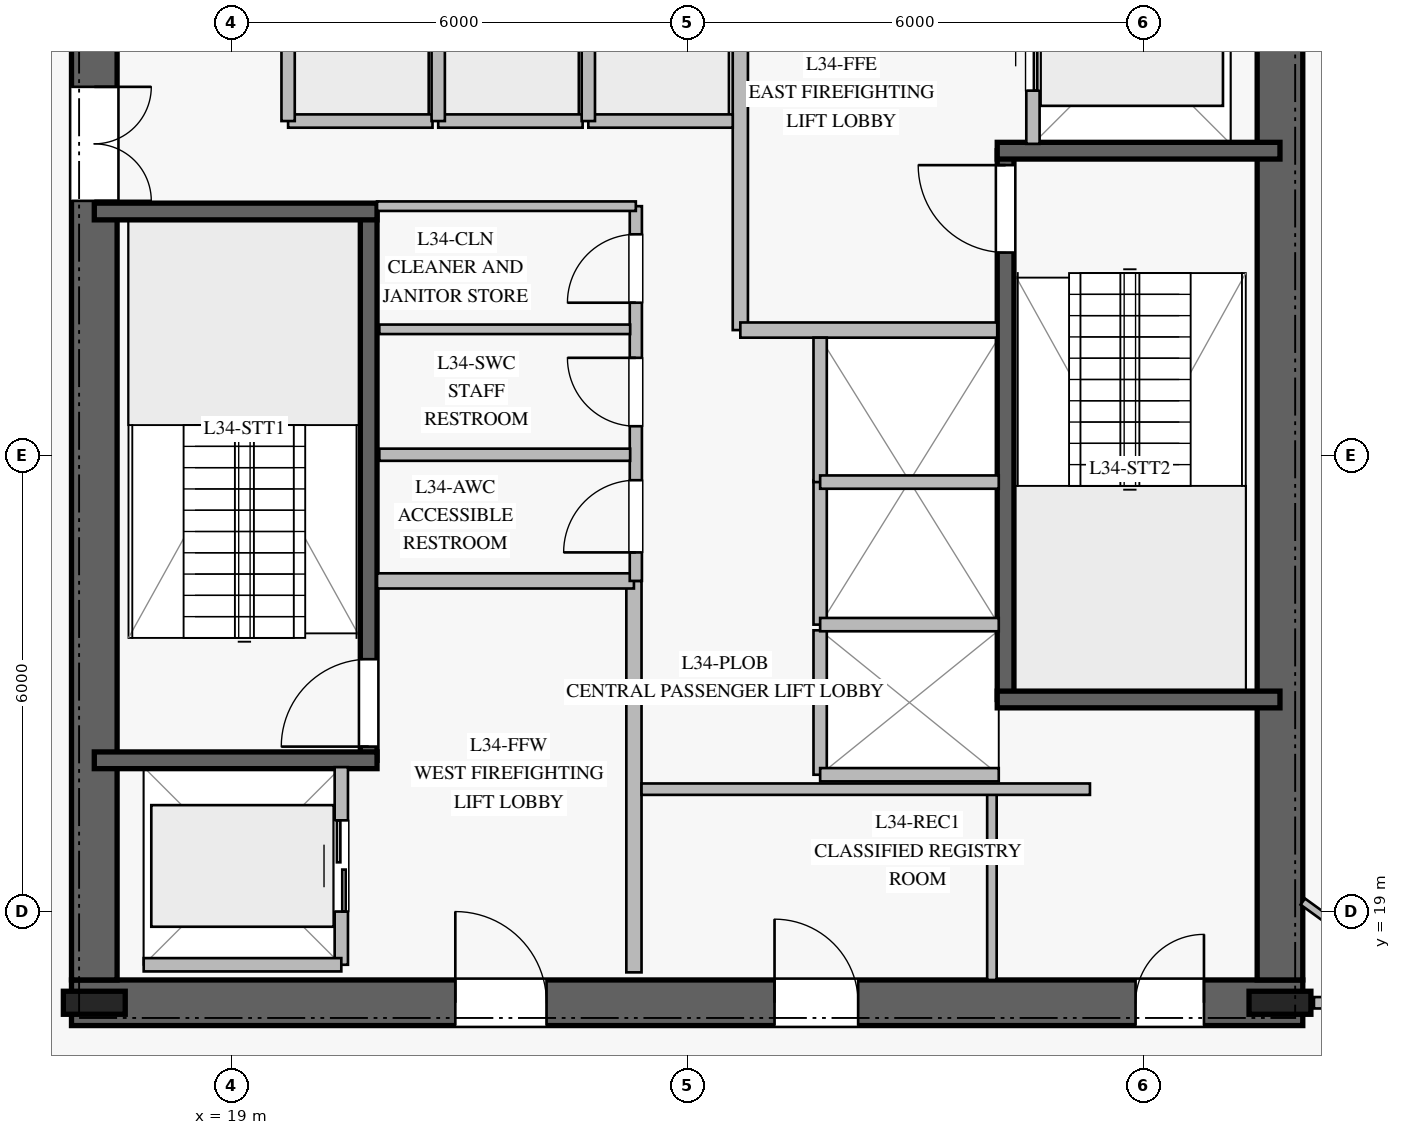
"""IFC4 building model, lengths in metres.
Left out: names, types, materials, properties, quantities, classifications, styles, units other than length and angle.
Written with IfcOpenShell. Run it as: python <this file> out.ifc"""

import sys

from ifc_helpers import new_model, si_unit, direction, frame, frame_2d, origin, origin_2d, place, context, subcontext, project, spatial, rectangle, i_section, extrude, element, fill, save


model = new_model("IFC4")
c1 = context("Model", 3, precision=1e-05, world=origin(), true_north=direction((0.0, 1.0)))
c2 = subcontext(c1, "Body", "Model", "MODEL_VIEW")
j1 = project(units=[si_unit("LENGTHUNIT", "METRE"), si_unit("PLANEANGLEUNIT", "RADIAN")], contexts=[c1])
p1 = place(None, origin())
s1 = spatial("IfcSite", under=j1, at=p1, CompositionType="ELEMENT")
p2 = place(p1, origin())
s2 = spatial("IfcBuilding", under=s1, at=p2, CompositionType="ELEMENT")
p3 = place(p2, frame((0.0, 0.0, 142.4)))
s3 = spatial("IfcBuildingStorey", under=s2, at=p3, CompositionType="ELEMENT", Elevation=142.4)
p4 = place(p3, frame((16.9, 17.8, 0.0), z_axis=(0.0, 0.0, 1.0), x_axis=(1.0, 0.0, 0.0)))
e1 = element("IfcWall", 1, at=p4, inside=s3, PredefinedType="SHEAR", context=c2, shape_type="SweptSolid", body=[
    extrude(rectangle(XDim=16.2, YDim=0.6, at=frame_2d((8.1, 0.0))), origin(), (0.0, 0.0, 1.0), 3.76),
])
p5 = place(p4, frame((5.05, 0.0, 0.0)))
e2 = element("IfcOpeningElement", 2, at=p5, cuts=e1, PredefinedType="OPENING", context=c2, shape_type="SweptSolid", body=[
    extrude(rectangle(XDim=1.2, YDim=2.25, at=frame_2d((0.6, 1.125))), frame((0.0, 0.31, 0.0), z_axis=(0.0, -1.0, 0.0), x_axis=(1.0, 0.0, 0.0)), (0.0, 0.0, 1.0), 0.62),
])
p6 = place(p4, frame((14.0, 0.0, 0.0)))
e3 = element("IfcOpeningElement", 3, at=p6, cuts=e1, PredefinedType="OPENING", context=c2, shape_type="SweptSolid", body=[
    extrude(rectangle(XDim=0.9, YDim=2.1, at=frame_2d((0.45, 1.05))), frame((0.0, 0.31, 0.0), z_axis=(0.0, -1.0, 0.0), x_axis=(1.0, 0.0, 0.0)), (0.0, 0.0, 1.0), 0.62),
])
p7 = place(p4, frame((9.25, 0.0, 0.0)))
e4 = element("IfcOpeningElement", 4, at=p7, cuts=e1, PredefinedType="OPENING", context=c2, shape_type="SweptSolid", body=[
    extrude(rectangle(XDim=1.1, YDim=2.2, at=frame_2d((0.55, 1.1))), frame((0.0, 0.31, 0.0), z_axis=(0.0, -1.0, 0.0), x_axis=(1.0, 0.0, 0.0)), (0.0, 0.0, 1.0), 0.62),
])
p8 = place(p3, frame((17.2, 31.9, 0.0), z_axis=(0.0, 0.0, 1.0), x_axis=(0.0, -1.0, 0.0)))
e5 = element("IfcWall", 5, at=p8, inside=s3, PredefinedType="SHEAR", context=c2, shape_type="SweptSolid", body=[
    extrude(rectangle(XDim=13.8, YDim=0.6, at=frame_2d((6.9, 0.0))), origin(), (0.0, 0.0, 1.0), 3.76),
])
p9 = place(p8, frame((2.05, 0.0, 0.0)))
e6 = element("IfcOpeningElement", 6, at=p9, cuts=e5, PredefinedType="OPENING", context=c2, shape_type="SweptSolid", body=[
    extrude(rectangle(XDim=1.5, YDim=2.2, at=frame_2d((0.75, 1.1))), frame((0.0, 0.31, 0.0), z_axis=(0.0, -1.0, 0.0), x_axis=(1.0, 0.0, 0.0)), (0.0, 0.0, 1.0), 0.62),
])
p10 = place(p3, frame((32.8, 18.1, 0.0), z_axis=(0.0, 0.0, 1.0), x_axis=(0.0, 1.0, 0.0)))
e7 = element("IfcWall", 7, at=p10, inside=s3, PredefinedType="SHEAR", context=c2, shape_type="SweptSolid", body=[
    extrude(rectangle(XDim=13.8, YDim=0.6, at=frame_2d((6.9, 0.0))), origin(), (0.0, 0.0, 1.0), 3.76),
])
for number, where, z_axis, x_axis in (
    (8, (17.2, 17.8, 0.0), (0.0, 0.0, 1.0), (1.0, 0.0, 0.0)),
    (9, (32.8, 17.8, 0.0), (0.0, 0.0, 1.0), (1.0, 0.0, 0.0)),
):
    element("IfcColumn", number, at=place(p3, frame(where, z_axis=z_axis, x_axis=x_axis)), inside=s3, PredefinedType="COLUMN", context=c2, shape_type="SweptSolid", body=[
        extrude(i_section(OverallWidth=0.303, OverallDepth=0.814, WebThickness=0.021, FlangeThickness=0.04, at=origin_2d()), origin(), (0.0, 0.0, 1.0), 4.0),
    ])
p11 = place(p3, frame((20.81, 20.99, 0.0), z_axis=(0.0, 0.0, 1.0), x_axis=(0.0, 1.0, 0.0)))
e10 = element("IfcWall", 10, at=p11, inside=s3, PredefinedType="SOLIDWALL", context=c2, shape_type="SweptSolid", body=[
    extrude(rectangle(XDim=7.22, YDim=0.22, at=frame_2d((3.61, 0.0))), origin(), (0.0, 0.0, 1.0), 3.76),
])
p12 = place(p11, frame((0.18, 0.0, 0.0)))
e11 = element("IfcOpeningElement", 11, at=p12, cuts=e10, PredefinedType="OPENING", context=c2, shape_type="SweptSolid", body=[
    extrude(rectangle(XDim=1.15, YDim=2.2, at=frame_2d((0.575, 1.1))), frame((0.0, 0.12, 0.0), z_axis=(0.0, -1.0, 0.0), x_axis=(1.0, 0.0, 0.0)), (0.0, 0.0, 1.0), 0.24),
])
for number, where, z_axis, x_axis in (
    (12, (17.2, 20.99, 0.0), (0.0, 0.0, 1.0), (1.0, 0.0, 0.0)),
    (13, (17.2, 28.21, 0.0), (0.0, 0.0, 1.0), (1.0, 0.0, 0.0)),
):
    element("IfcWall", number, at=place(p3, frame(where, z_axis=z_axis, x_axis=x_axis)), inside=s3, PredefinedType="SOLIDWALL", context=c2, shape_type="SweptSolid", body=[
        extrude(rectangle(XDim=3.72, YDim=0.22, at=frame_2d((1.86, 0.0))), origin(), (0.0, 0.0, 1.0), 3.76),
    ])
p13 = place(p3, frame((29.19, 21.79, 0.0), z_axis=(0.0, 0.0, 1.0), x_axis=(0.0, 1.0, 0.0)))
e14 = element("IfcWall", 14, at=p13, inside=s3, PredefinedType="SOLIDWALL", context=c2, shape_type="SweptSolid", body=[
    extrude(rectangle(XDim=7.22, YDim=0.22, at=frame_2d((3.61, 0.0))), origin(), (0.0, 0.0, 1.0), 3.76),
])
p14 = place(p13, frame((5.88, 0.0, 0.0)))
e15 = element("IfcOpeningElement", 15, at=p14, cuts=e14, PredefinedType="OPENING", context=c2, shape_type="SweptSolid", body=[
    extrude(rectangle(XDim=1.15, YDim=2.2, at=frame_2d((0.575, 1.1))), frame((0.0, 0.12, 0.0), z_axis=(0.0, -1.0, 0.0), x_axis=(1.0, 0.0, 0.0)), (0.0, 0.0, 1.0), 0.24),
])
for number, where, z_axis, x_axis in (
    (16, (29.08, 21.79, 0.0), (0.0, 0.0, 1.0), (1.0, 0.0, 0.0)),
    (17, (29.08, 29.01, 0.0), (0.0, 0.0, 1.0), (1.0, 0.0, 0.0)),
):
    element("IfcWall", number, at=place(p3, frame(where, z_axis=z_axis, x_axis=x_axis)), inside=s3, PredefinedType="SOLIDWALL", context=c2, shape_type="SweptSolid", body=[
        extrude(rectangle(XDim=3.72, YDim=0.22, at=frame_2d((1.86, 0.0))), origin(), (0.0, 0.0, 1.0), 3.76),
    ])
p15 = place(p3, frame((24.3, 18.2, 0.0), z_axis=(0.0, 0.0, 1.0), x_axis=(0.0, 1.0, 0.0)))
e18 = element("IfcWall", 18, at=p15, inside=s3, PredefinedType="PARTITIONING", context=c2, shape_type="SweptSolid", body=[
    extrude(rectangle(XDim=5.15, YDim=0.2, at=frame_2d((2.575, 0.0))), origin(), (0.0, 0.0, 1.0), 3.76),
])
p16 = place(p3, frame((20.92, 23.35, 0.0), z_axis=(0.0, 0.0, 1.0), x_axis=(1.0, 0.0, 0.0)))
e19 = element("IfcWall", 19, at=p16, inside=s3, PredefinedType="PARTITIONING", context=c2, shape_type="SweptSolid", body=[
    extrude(rectangle(XDim=3.38, YDim=0.2, at=frame_2d((1.69, 0.0))), origin(), (0.0, 0.0, 1.0), 3.76),
])
p17 = place(p3, frame((25.7, 26.65, 0.0), z_axis=(0.0, 0.0, 1.0), x_axis=(0.0, 1.0, 0.0)))
e20 = element("IfcWall", 20, at=p17, inside=s3, PredefinedType="PARTITIONING", context=c2, shape_type="SweptSolid", body=[
    extrude(rectangle(XDim=5.15, YDim=0.2, at=frame_2d((2.575, 0.0))), origin(), (0.0, 0.0, 1.0), 3.76),
])
p18 = place(p3, frame((25.7, 26.65, 0.0), z_axis=(0.0, 0.0, 1.0), x_axis=(1.0, 0.0, 0.0)))
e21 = element("IfcWall", 21, at=p18, inside=s3, PredefinedType="PARTITIONING", context=c2, shape_type="SweptSolid", body=[
    extrude(rectangle(XDim=3.38, YDim=0.2, at=frame_2d((1.69, 0.0))), origin(), (0.0, 0.0, 1.0), 3.76),
])
p19 = place(p3, frame((24.325, 23.35, 0.0), z_axis=(0.0, 0.0, 1.0), x_axis=(0.0, 1.0, 0.0)))
e22 = element("IfcWall", 22, at=p19, inside=s3, PredefinedType="PLUMBINGWALL", context=c2, shape_type="SweptSolid", body=[
    extrude(rectangle(XDim=4.93, YDim=0.16, at=frame_2d((2.465, 0.0))), origin(), (0.0, 0.0, 1.0), 3.76),
])
p20 = place(p19, frame((0.375, 0.0, 0.0)))
e23 = element("IfcOpeningElement", 23, at=p20, cuts=e22, PredefinedType="OPENING", context=c2, shape_type="SweptSolid", body=[
    extrude(rectangle(XDim=0.95, YDim=2.1, at=frame_2d((0.475, 1.05))), frame((0.0, 0.09, 0.0), z_axis=(0.0, -1.0, 0.0), x_axis=(1.0, 0.0, 0.0)), (0.0, 0.0, 1.0), 0.18),
])
p21 = place(p19, frame((2.035, 0.0, 0.0)))
e24 = element("IfcOpeningElement", 24, at=p21, cuts=e22, PredefinedType="OPENING", context=c2, shape_type="SweptSolid", body=[
    extrude(rectangle(XDim=0.9, YDim=2.1, at=frame_2d((0.45, 1.05))), frame((0.0, 0.09, 0.0), z_axis=(0.0, -1.0, 0.0), x_axis=(1.0, 0.0, 0.0)), (0.0, 0.0, 1.0), 0.18),
])
p22 = place(p19, frame((3.66, 0.0, 0.0)))
e25 = element("IfcOpeningElement", 25, at=p22, cuts=e22, PredefinedType="OPENING", context=c2, shape_type="SweptSolid", body=[
    extrude(rectangle(XDim=0.9, YDim=2.1, at=frame_2d((0.45, 1.05))), frame((0.0, 0.09, 0.0), z_axis=(0.0, -1.0, 0.0), x_axis=(1.0, 0.0, 0.0)), (0.0, 0.0, 1.0), 0.18),
])
p23 = place(p3, frame((20.92, 28.28, 0.0), z_axis=(0.0, 0.0, 1.0), x_axis=(1.0, 0.0, 0.0)))
e26 = element("IfcWall", 26, at=p23, inside=s3, PredefinedType="PARTITIONING", context=c2, shape_type="SweptSolid", body=[
    extrude(rectangle(XDim=3.405, YDim=0.125, at=frame_2d((1.703, 0.0))), origin(), (0.0, 0.0, 1.0), 3.76),
])
p24 = place(p3, frame((29.01, 18.1, 0.0), z_axis=(0.0, 0.0, 1.0), x_axis=(0.0, 1.0, 0.0)))
e27 = element("IfcWall", 27, at=p24, inside=s3, PredefinedType="PARTITIONING", context=c2, shape_type="SweptSolid", body=[
    extrude(rectangle(XDim=2.45, YDim=0.125, at=frame_2d((1.225, 0.0))), origin(), (0.0, 0.0, 1.0), 3.76),
])
p25 = place(p3, frame((20.95, 25.01, 0.0), z_axis=(0.0, 0.0, 1.0), x_axis=(1.0, 0.0, 0.0)))
e28 = element("IfcWall", 28, at=p25, inside=s3, PredefinedType="PLUMBINGWALL", context=c2, shape_type="SweptSolid", body=[
    extrude(rectangle(XDim=3.3, YDim=0.16, at=frame_2d((1.65, 0.0))), origin(), (0.0, 0.0, 1.0), 3.76),
])
p26 = place(p3, frame((20.95, 26.66, 0.0), z_axis=(0.0, 0.0, 1.0), x_axis=(1.0, 0.0, 0.0)))
e29 = element("IfcWall", 29, at=p26, inside=s3, PredefinedType="PARTITIONING", context=c2, shape_type="SweptSolid", body=[
    extrude(rectangle(XDim=3.3, YDim=0.125, at=frame_2d((1.65, 0.0))), origin(), (0.0, 0.0, 1.0), 3.76),
])
p27 = place(p3, frame((24.4, 20.61, 0.0), z_axis=(0.0, 0.0, 1.0), x_axis=(1.0, 0.0, 0.0)))
e30 = element("IfcWall", 30, at=p27, inside=s3, PredefinedType="PARTITIONING", context=c2, shape_type="SweptSolid", body=[
    extrude(rectangle(XDim=5.9, YDim=0.15, at=frame_2d((2.95, 0.0))), origin(), (0.0, 0.0, 1.0), 3.76),
])
p28 = place(p3, frame((19.75, 29.4, 0.0), z_axis=(0.0, 0.0, 1.0), x_axis=(1.0, 0.0, 0.0)))
e31 = element("IfcWall", 31, at=p28, inside=s3, PredefinedType="PARTITIONING", context=c2, shape_type="SweptSolid", body=[
    extrude(rectangle(XDim=1.9, YDim=0.175, at=frame_2d((0.95, 0.0))), origin(), (0.0, 0.0, 1.0), 3.76),
])
p29 = place(p3, frame((19.75, 29.4, 0.0), z_axis=(0.0, 0.0, 1.0), x_axis=(0.0, 1.0, 0.0)))
e32 = element("IfcWall", 32, at=p29, inside=s3, PredefinedType="PARTITIONING", context=c2, shape_type="SweptSolid", body=[
    extrude(rectangle(XDim=2.35, YDim=0.175, at=frame_2d((1.175, 0.0))), origin(), (0.0, 0.0, 1.0), 3.76),
])
p30 = place(p3, frame((21.725, 29.4, 0.0), z_axis=(0.0, 0.0, 1.0), x_axis=(1.0, 0.0, 0.0)))
e33 = element("IfcWall", 33, at=p30, inside=s3, PredefinedType="PARTITIONING", context=c2, shape_type="SweptSolid", body=[
    extrude(rectangle(XDim=1.9, YDim=0.175, at=frame_2d((0.95, 0.0))), origin(), (0.0, 0.0, 1.0), 3.76),
])
p31 = place(p3, frame((21.725, 29.4, 0.0), z_axis=(0.0, 0.0, 1.0), x_axis=(0.0, 1.0, 0.0)))
e34 = element("IfcWall", 34, at=p31, inside=s3, PredefinedType="PARTITIONING", context=c2, shape_type="SweptSolid", body=[
    extrude(rectangle(XDim=2.35, YDim=0.175, at=frame_2d((1.175, 0.0))), origin(), (0.0, 0.0, 1.0), 3.76),
])
p32 = place(p3, frame((23.7, 29.4, 0.0), z_axis=(0.0, 0.0, 1.0), x_axis=(1.0, 0.0, 0.0)))
e35 = element("IfcWall", 35, at=p32, inside=s3, PredefinedType="PARTITIONING", context=c2, shape_type="SweptSolid", body=[
    extrude(rectangle(XDim=1.9, YDim=0.175, at=frame_2d((0.95, 0.0))), origin(), (0.0, 0.0, 1.0), 3.76),
])
p33 = place(p3, frame((23.7, 29.4, 0.0), z_axis=(0.0, 0.0, 1.0), x_axis=(0.0, 1.0, 0.0)))
e36 = element("IfcWall", 36, at=p33, inside=s3, PredefinedType="PARTITIONING", context=c2, shape_type="SweptSolid", body=[
    extrude(rectangle(XDim=2.35, YDim=0.175, at=frame_2d((1.175, 0.0))), origin(), (0.0, 0.0, 1.0), 3.76),
])
p34 = place(p3, frame((26.75, 20.8, 0.0), z_axis=(0.0, 0.0, 1.0), x_axis=(0.0, 1.0, 0.0)))
e37 = element("IfcWall", 37, at=p34, inside=s3, PredefinedType="PARTITIONING", context=c2, shape_type="SweptSolid", body=[
    extrude(rectangle(XDim=1.9, YDim=0.175, at=frame_2d((0.95, 0.0))), origin(), (0.0, 0.0, 1.0), 3.76),
])
p35 = place(p3, frame((26.75, 20.8, 0.0), z_axis=(0.0, 0.0, 1.0), x_axis=(1.0, 0.0, 0.0)))
e38 = element("IfcWall", 38, at=p35, inside=s3, PredefinedType="PARTITIONING", context=c2, shape_type="SweptSolid", body=[
    extrude(rectangle(XDim=2.35, YDim=0.175, at=frame_2d((1.175, 0.0))), origin(), (0.0, 0.0, 1.0), 3.76),
])
p36 = place(p3, frame((26.75, 22.775, 0.0), z_axis=(0.0, 0.0, 1.0), x_axis=(0.0, 1.0, 0.0)))
e39 = element("IfcWall", 39, at=p36, inside=s3, PredefinedType="PARTITIONING", context=c2, shape_type="SweptSolid", body=[
    extrude(rectangle(XDim=1.9, YDim=0.175, at=frame_2d((0.95, 0.0))), origin(), (0.0, 0.0, 1.0), 3.76),
])
p37 = place(p3, frame((26.75, 22.775, 0.0), z_axis=(0.0, 0.0, 1.0), x_axis=(1.0, 0.0, 0.0)))
e40 = element("IfcWall", 40, at=p37, inside=s3, PredefinedType="PARTITIONING", context=c2, shape_type="SweptSolid", body=[
    extrude(rectangle(XDim=2.35, YDim=0.175, at=frame_2d((1.175, 0.0))), origin(), (0.0, 0.0, 1.0), 3.76),
])
p38 = place(p3, frame((26.75, 24.65, 0.0), z_axis=(0.0, 0.0, 1.0), x_axis=(0.0, 1.0, 0.0)))
e41 = element("IfcWall", 41, at=p38, inside=s3, PredefinedType="PARTITIONING", context=c2, shape_type="SweptSolid", body=[
    extrude(rectangle(XDim=1.9, YDim=0.175, at=frame_2d((0.95, 0.0))), origin(), (0.0, 0.0, 1.0), 3.76),
])
p39 = place(p3, frame((26.75, 24.65, 0.0), z_axis=(0.0, 0.0, 1.0), x_axis=(1.0, 0.0, 0.0)))
e42 = element("IfcWall", 42, at=p39, inside=s3, PredefinedType="PARTITIONING", context=c2, shape_type="SweptSolid", body=[
    extrude(rectangle(XDim=2.35, YDim=0.175, at=frame_2d((1.175, 0.0))), origin(), (0.0, 0.0, 1.0), 3.76),
])
p40 = place(p3, frame((20.45, 18.3, 0.0), z_axis=(0.0, 0.0, 1.0), x_axis=(0.0, 1.0, 0.0)))
e43 = element("IfcWall", 43, at=p40, inside=s3, PredefinedType="PARTITIONING", context=c2, shape_type="SweptSolid", body=[
    extrude(rectangle(XDim=2.6, YDim=0.175, at=frame_2d((1.3, 0.0))), origin(), (0.0, 0.0, 1.0), 3.76),
])
p41 = place(p40, frame((0.7, 0.0, 0.0)))
e44 = element("IfcOpeningElement", 44, at=p41, cuts=e43, PredefinedType="OPENING", context=c2, shape_type="SweptSolid", body=[
    extrude(rectangle(XDim=1.2, YDim=2.2, at=frame_2d((0.6, 1.1))), frame((0.0, 0.098, 0.0), z_axis=(0.0, -1.0, 0.0), x_axis=(1.0, 0.0, 0.0)), (0.0, 0.0, 1.0), 0.195),
])
p42 = place(p3, frame((17.85, 18.3, 0.0), z_axis=(0.0, 0.0, 1.0), x_axis=(1.0, 0.0, 0.0)))
e45 = element("IfcWall", 45, at=p42, inside=s3, PredefinedType="PARTITIONING", context=c2, shape_type="SweptSolid", body=[
    extrude(rectangle(XDim=2.6, YDim=0.175, at=frame_2d((1.3, 0.0))), origin(), (0.0, 0.0, 1.0), 3.76),
])
p43 = place(p3, frame((29.55, 29.1, 0.0), z_axis=(0.0, 0.0, 1.0), x_axis=(0.0, 1.0, 0.0)))
e46 = element("IfcWall", 46, at=p43, inside=s3, PredefinedType="PARTITIONING", context=c2, shape_type="SweptSolid", body=[
    extrude(rectangle(XDim=2.6, YDim=0.175, at=frame_2d((1.3, 0.0))), origin(), (0.0, 0.0, 1.0), 3.76),
])
p44 = place(p43, frame((0.7, 0.0, 0.0)))
e47 = element("IfcOpeningElement", 47, at=p44, cuts=e46, PredefinedType="OPENING", context=c2, shape_type="SweptSolid", body=[
    extrude(rectangle(XDim=1.2, YDim=2.2, at=frame_2d((0.6, 1.1))), frame((0.0, 0.098, 0.0), z_axis=(0.0, -1.0, 0.0), x_axis=(1.0, 0.0, 0.0)), (0.0, 0.0, 1.0), 0.195),
])
p45 = place(p3, frame((33.247, 17.8, 0.0), z_axis=(0.0, 0.0, 1.0), x_axis=(1.0, 0.0, 0.0)))
e48 = element("IfcWall", 48, at=p45, inside=s3, PredefinedType="PARTITIONING", context=c2, shape_type="SweptSolid", body=[
    extrude(rectangle(XDim=7.953, YDim=0.15, at=frame_2d((3.977, 0.0))), origin(), (0.0, 0.0, 1.0), 3.21),
])
p46 = place(p3, frame((33.1, 19.131, 0.0), z_axis=(0.0, 0.0, 1.0), x_axis=(0.809758735958, -0.586762975604, 0.0)))
e49 = element("IfcWall", 49, at=p46, inside=s3, PredefinedType="MOVABLE", context=c2, shape_type="SweptSolid", body=[
    extrude(rectangle(XDim=2.269, YDim=0.1, at=frame_2d((1.134, 0.0))), origin(), (0.0, 0.0, 1.0), 3.21),
])
p47 = place(p12, origin())
e50 = element("IfcDoor", 50, at=p47, inside=s3, OperationType="SINGLE_SWING_LEFT", PredefinedType="DOOR", context=c2, shape_type="SweptSolid", body=[
    extrude(rectangle(XDim=1.15, YDim=2.2, at=frame_2d((0.575, 1.1))), frame((0.0, 0.025, 0.0), z_axis=(0.0, -1.0, 0.0), x_axis=(1.0, 0.0, 0.0)), (0.0, 0.0, 1.0), 0.05),
])
fill(e11, e50)
p48 = place(p14, origin())
e51 = element("IfcDoor", 51, at=p48, inside=s3, OperationType="SINGLE_SWING_RIGHT", PredefinedType="DOOR", context=c2, shape_type="SweptSolid", body=[
    extrude(rectangle(XDim=1.15, YDim=2.2, at=frame_2d((0.575, 1.1))), frame((0.0, 0.025, 0.0), z_axis=(0.0, -1.0, 0.0), x_axis=(1.0, 0.0, 0.0)), (0.0, 0.0, 1.0), 0.05),
])
fill(e15, e51)
p49 = place(p5, origin())
e52 = element("IfcDoor", 52, at=p49, inside=s3, OperationType="SINGLE_SWING_LEFT", PredefinedType="DOOR", context=c2, shape_type="SweptSolid", body=[
    extrude(rectangle(XDim=1.2, YDim=2.25, at=frame_2d((0.6, 1.125))), frame((0.0, 0.025, 0.0), z_axis=(0.0, -1.0, 0.0), x_axis=(1.0, 0.0, 0.0)), (0.0, 0.0, 1.0), 0.05),
])
fill(e2, e52)
p50 = place(p9, origin())
e53 = element("IfcDoor", 53, at=p50, inside=s3, OperationType="DOUBLE_DOOR_SINGLE_SWING", PredefinedType="DOOR", context=c2, shape_type="SweptSolid", body=[
    extrude(rectangle(XDim=1.5, YDim=2.2, at=frame_2d((0.75, 1.1))), frame((0.0, 0.025, 0.0), z_axis=(0.0, -1.0, 0.0), x_axis=(1.0, 0.0, 0.0)), (0.0, 0.0, 1.0), 0.05),
])
fill(e6, e53)
p51 = place(p20, origin())
e54 = element("IfcDoor", 54, at=p51, inside=s3, OperationType="SINGLE_SWING_LEFT", PredefinedType="DOOR", context=c2, shape_type="SweptSolid", body=[
    extrude(rectangle(XDim=0.95, YDim=2.1, at=frame_2d((0.475, 1.05))), frame((0.0, 0.025, 0.0), z_axis=(0.0, -1.0, 0.0), x_axis=(1.0, 0.0, 0.0)), (0.0, 0.0, 1.0), 0.05),
])
fill(e23, e54)
p52 = place(p21, origin())
e55 = element("IfcDoor", 55, at=p52, inside=s3, OperationType="SINGLE_SWING_RIGHT", PredefinedType="DOOR", context=c2, shape_type="SweptSolid", body=[
    extrude(rectangle(XDim=0.9, YDim=2.1, at=frame_2d((0.45, 1.05))), frame((0.0, 0.025, 0.0), z_axis=(0.0, -1.0, 0.0), x_axis=(1.0, 0.0, 0.0)), (0.0, 0.0, 1.0), 0.05),
])
fill(e24, e55)
p53 = place(p22, origin())
e56 = element("IfcDoor", 56, at=p53, inside=s3, OperationType="SINGLE_SWING_LEFT", PredefinedType="DOOR", context=c2, shape_type="SweptSolid", body=[
    extrude(rectangle(XDim=0.9, YDim=2.1, at=frame_2d((0.45, 1.05))), frame((0.0, 0.025, 0.0), z_axis=(0.0, -1.0, 0.0), x_axis=(1.0, 0.0, 0.0)), (0.0, 0.0, 1.0), 0.05),
])
fill(e25, e56)
p54 = place(p6, origin())
e57 = element("IfcDoor", 57, at=p54, inside=s3, OperationType="SINGLE_SWING_RIGHT", PredefinedType="DOOR", context=c2, shape_type="SweptSolid", body=[
    extrude(rectangle(XDim=0.9, YDim=2.1, at=frame_2d((0.45, 1.05))), frame((0.0, 0.025, 0.0), z_axis=(0.0, -1.0, 0.0), x_axis=(1.0, 0.0, 0.0)), (0.0, 0.0, 1.0), 0.05),
])
fill(e3, e57)
p55 = place(p7, origin())
e58 = element("IfcDoor", 58, at=p55, inside=s3, OperationType="SINGLE_SWING_LEFT", PredefinedType="DOOR", context=c2, shape_type="SweptSolid", body=[
    extrude(rectangle(XDim=1.1, YDim=2.2, at=frame_2d((0.55, 1.1))), frame((0.0, 0.025, 0.0), z_axis=(0.0, -1.0, 0.0), x_axis=(1.0, 0.0, 0.0)), (0.0, 0.0, 1.0), 0.05),
])
fill(e4, e58)
p56 = place(p41, origin())
e59 = element("IfcDoor", 59, at=p56, inside=s3, OperationType="DOUBLE_DOOR_SLIDING", PredefinedType="DOOR", context=c2, shape_type="SweptSolid", body=[
    extrude(rectangle(XDim=1.2, YDim=2.2, at=frame_2d((0.6, 1.1))), frame((0.0, 0.025, 0.0), z_axis=(0.0, -1.0, 0.0), x_axis=(1.0, 0.0, 0.0)), (0.0, 0.0, 1.0), 0.05),
])
fill(e44, e59)
p57 = place(p44, origin())
e60 = element("IfcDoor", 60, at=p57, inside=s3, OperationType="DOUBLE_DOOR_SLIDING", PredefinedType="DOOR", context=c2, shape_type="SweptSolid", body=[
    extrude(rectangle(XDim=1.2, YDim=2.2, at=frame_2d((0.6, 1.1))), frame((0.0, 0.025, 0.0), z_axis=(0.0, -1.0, 0.0), x_axis=(1.0, 0.0, 0.0)), (0.0, 0.0, 1.0), 0.05),
])
fill(e47, e60)
save(model, sys.argv[1])
